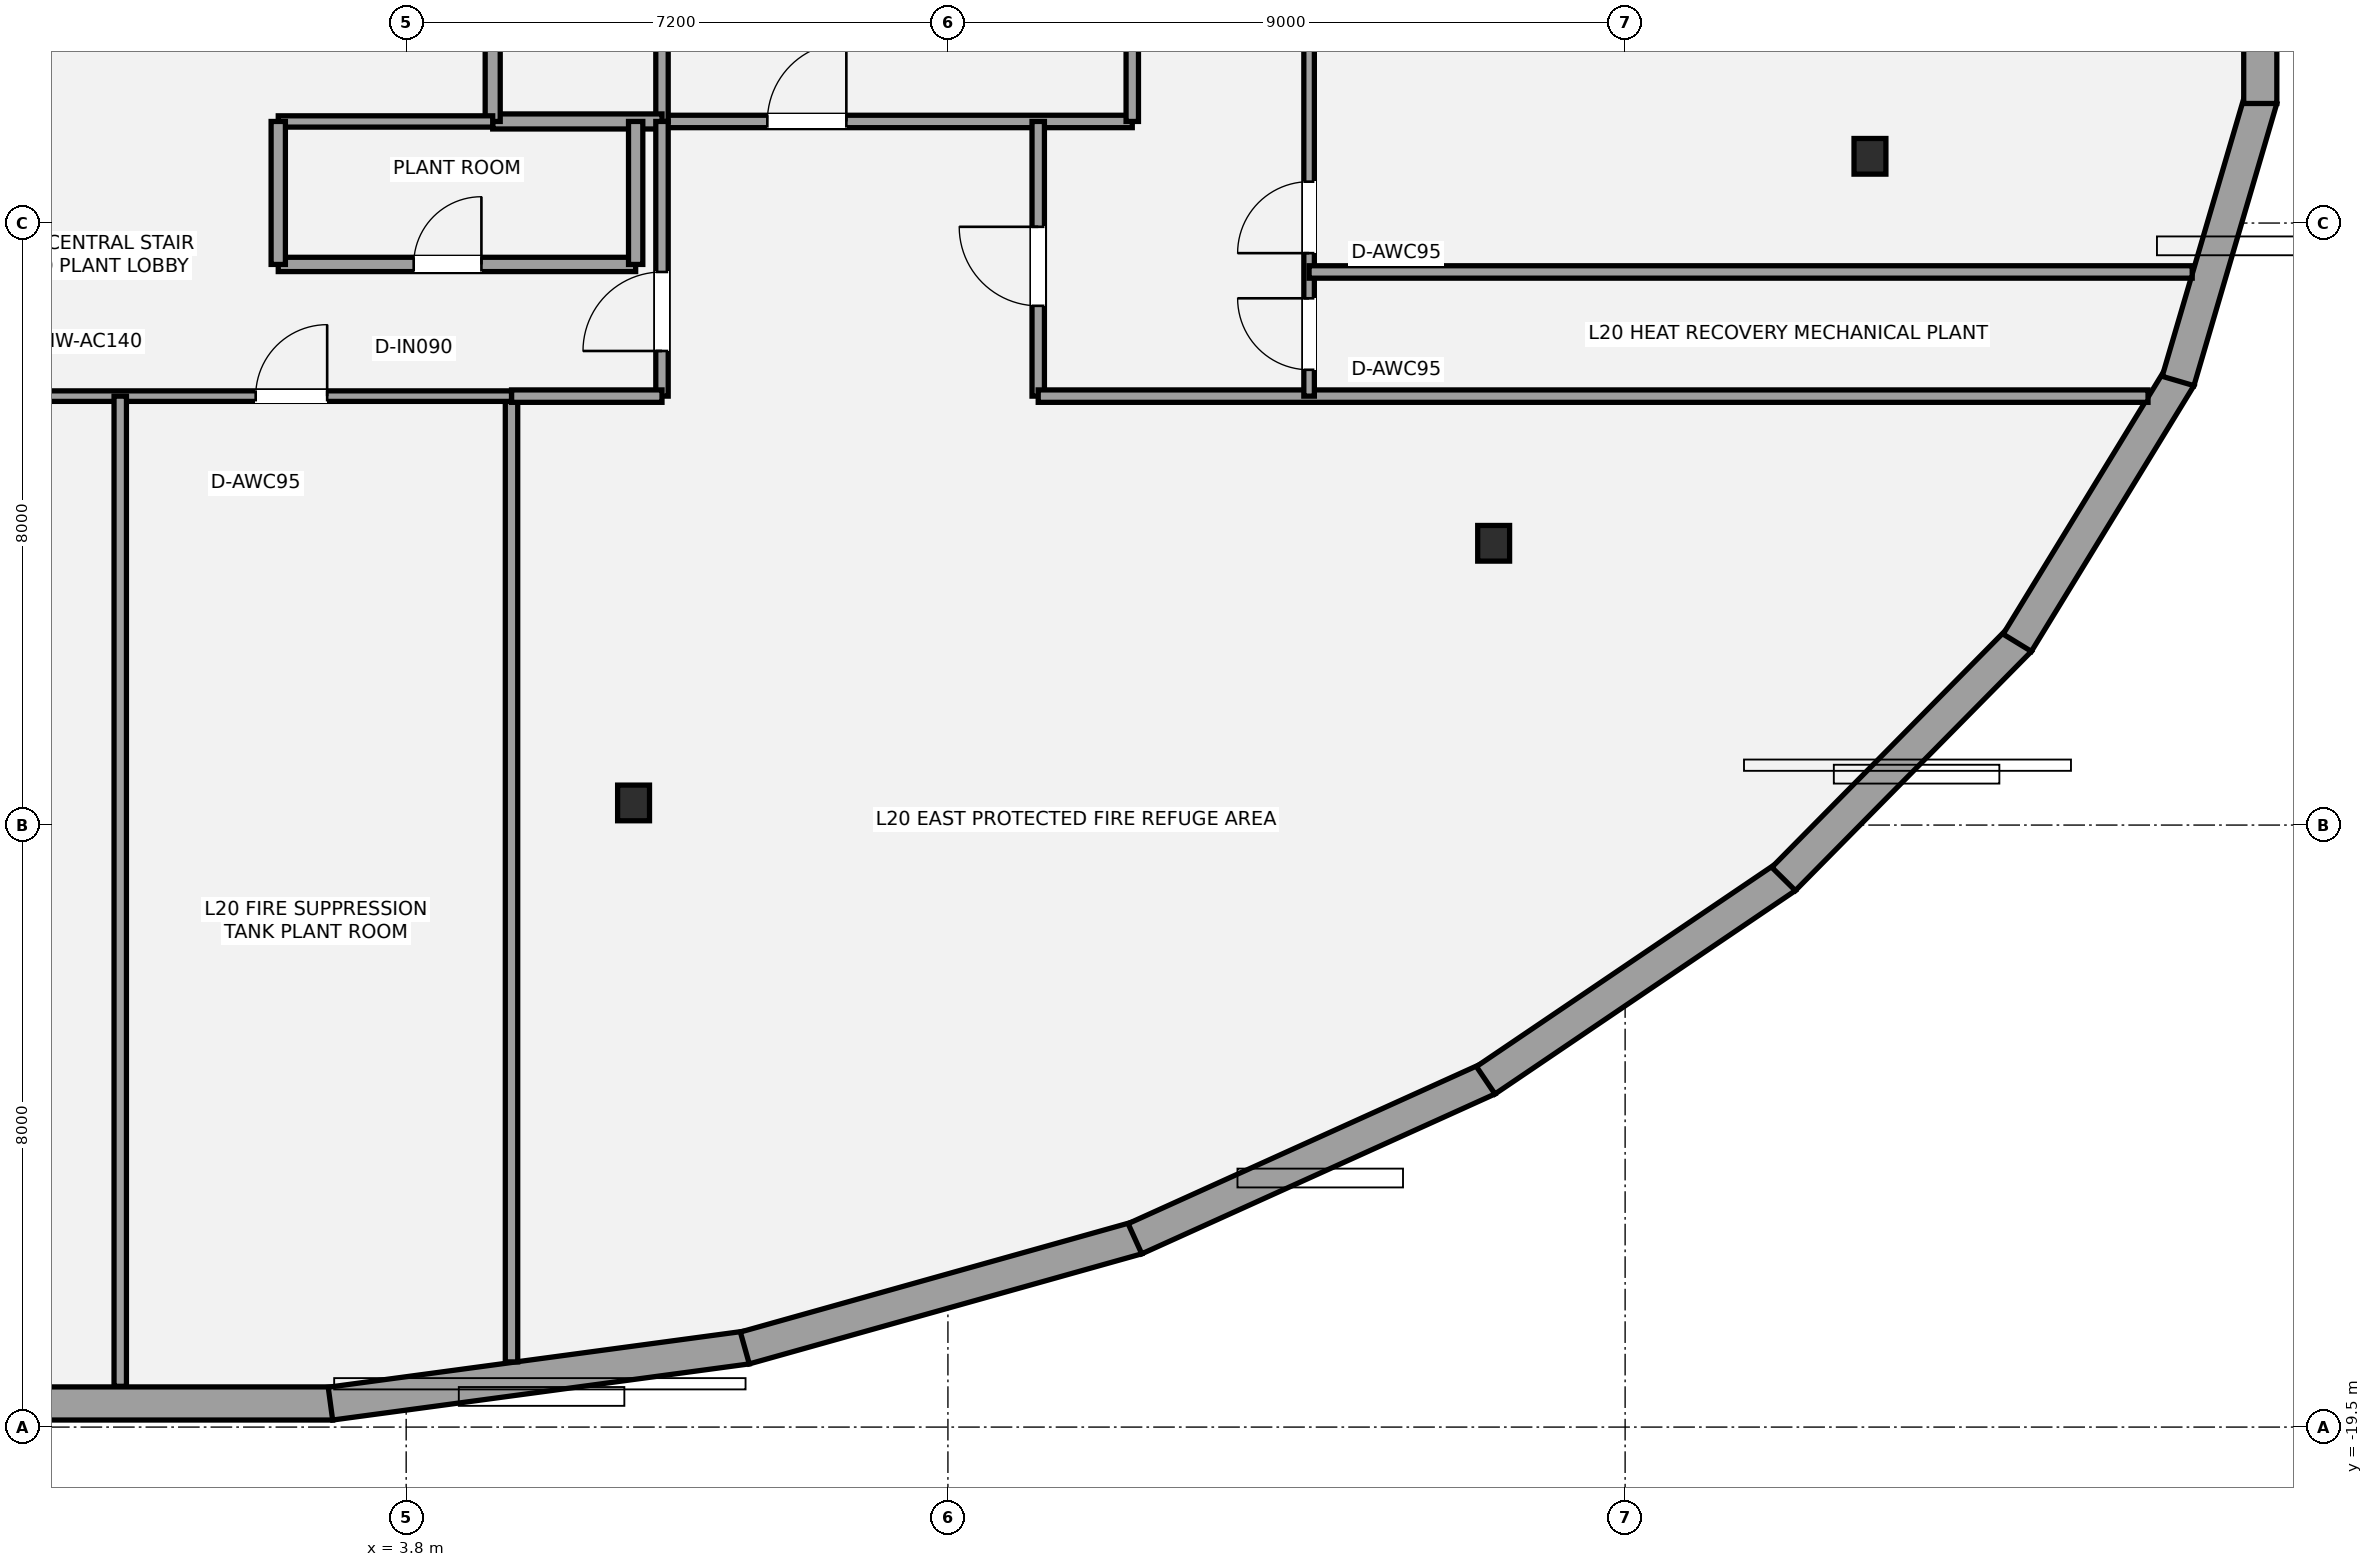
"""IFC4 building model, lengths in metres.
Left out: names, types, materials, properties, quantities, classifications, styles, units other than length and angle.
Written with IfcOpenShell. Run it as: python <this file> out.ifc"""

import sys

from ifc_helpers import new_model, si_unit, direction, frame, frame_2d, origin, origin_2d, place, context, subcontext, project, spatial, rectangle, i_section, extrude, element, fill, save


model = new_model("IFC4")
c1 = context("Model", 3, precision=1e-05, world=origin(), true_north=direction((0.0, 1.0)))
c2 = subcontext(c1, "Body", "Model", "MODEL_VIEW")
j1 = project(units=[si_unit("LENGTHUNIT", "METRE"), si_unit("PLANEANGLEUNIT", "RADIAN")], contexts=[c1])
p1 = place(None, origin())
s1 = spatial("IfcSite", under=j1, at=p1, CompositionType="ELEMENT")
p2 = place(p1, origin())
s2 = spatial("IfcBuilding", under=s1, at=p2, CompositionType="ELEMENT")
p3 = place(p2, frame((0.0, 0.0, 77.4)))
s3 = spatial("IfcBuildingStorey", under=s2, at=p3, CompositionType="ELEMENT", Elevation=77.4)
for number, where, z_axis, x_axis in (
    (1, (6.822, -11.206, 0.0), (0.0, 0.0, 1.0), (1.0, 0.0, 0.0)),
    (2, (18.253, -7.756, 0.0), (0.0, 0.0, 1.0), (1.0, 0.0, 0.0)),
    (3, (23.254, -2.613, 0.0), (0.0, 0.0, 1.0), (1.0, 0.0, 0.0)),
):
    element("IfcColumn", number, at=place(p3, frame(where, z_axis=z_axis, x_axis=x_axis)), inside=s3, PredefinedType="COLUMN", context=c2, shape_type="SweptSolid", body=[
        extrude(i_section(OverallWidth=0.424, OverallDepth=0.474, WebThickness=0.048, FlangeThickness=0.077, at=origin_2d()), origin(), (0.0, 0.0, 1.0), 4.5),
    ])
p4 = place(p3, frame((2.823, -19.186, 0.0), z_axis=(0.0, 0.0, 1.0), x_axis=(-1.0, 0.0, 0.0)))
e4 = element("IfcWall", 4, at=p4, inside=s3, PredefinedType="STANDARD", context=c2, shape_type="SweptSolid", body=[
    extrude(rectangle(XDim=5.646, YDim=0.44, at=frame_2d((2.823, 0.0))), origin(), (0.0, 0.0, 1.0), 3.498),
])
p5 = place(p3, frame((8.331, -18.442, 0.0), z_axis=(0.0, 0.0, 1.0), x_axis=(-0.9910561058, -0.133445851026, 0.0)))
e5 = element("IfcWall", 5, at=p5, inside=s3, PredefinedType="STANDARD", context=c2, shape_type="SweptSolid", body=[
    extrude(rectangle(XDim=5.587, YDim=0.44, at=frame_2d((2.794, 0.0))), origin(), (0.0, 0.0, 1.0), 3.498),
])
p6 = place(p3, frame((13.517, -16.986, 0.0), z_axis=(0.0, 0.0, 1.0), x_axis=(-0.962849260033, -0.270039446109, 0.0)))
e6 = element("IfcWall", 6, at=p6, inside=s3, PredefinedType="STANDARD", context=c2, shape_type="SweptSolid", body=[
    extrude(rectangle(XDim=5.417, YDim=0.44, at=frame_2d((2.708, 0.0))), origin(), (0.0, 0.0, 1.0), 3.498),
])
p7 = place(p3, frame((18.18, -14.873, 0.0), z_axis=(0.0, 0.0, 1.0), x_axis=(-0.911088856004, -0.412210014999, 0.0)))
e7 = element("IfcWall", 7, at=p7, inside=s3, PredefinedType="STANDARD", context=c2, shape_type="SweptSolid", body=[
    extrude(rectangle(XDim=5.152, YDim=0.44, at=frame_2d((2.576, 0.0))), origin(), (0.0, 0.0, 1.0), 3.498),
])
p8 = place(p3, frame((22.139, -12.188, 0.0), z_axis=(0.0, 0.0, 1.0), x_axis=(-0.82804003003, -0.560668983151, 0.0)))
e8 = element("IfcWall", 8, at=p8, inside=s3, PredefinedType="STANDARD", context=c2, shape_type="SweptSolid", body=[
    extrude(rectangle(XDim=4.821, YDim=0.44, at=frame_2d((2.411, 0.0))), origin(), (0.0, 0.0, 1.0), 3.498),
])
p9 = place(p3, frame((25.243, -9.038, 0.0), z_axis=(0.0, 0.0, 1.0), x_axis=(-0.702361901729, -0.711820032733, 0.0)))
e9 = element("IfcWall", 9, at=p9, inside=s3, PredefinedType="STANDARD", context=c2, shape_type="SweptSolid", body=[
    extrude(rectangle(XDim=4.466, YDim=0.44, at=frame_2d((2.233, 0.0))), origin(), (0.0, 0.0, 1.0), 3.498),
])
p10 = place(p3, frame((27.372, -5.546, 0.0), z_axis=(0.0, 0.0, 1.0), x_axis=(-0.521891226532, -0.85301204427, 0.0)))
e10 = element("IfcWall", 10, at=p10, inside=s3, PredefinedType="STANDARD", context=c2, shape_type="SweptSolid", body=[
    extrude(rectangle(XDim=4.14, YDim=0.44, at=frame_2d((2.07, 0.0))), origin(), (0.0, 0.0, 1.0), 3.498),
])
p11 = place(p3, frame((28.45, -1.849, 0.0), z_axis=(0.0, 0.0, 1.0), x_axis=(-0.281834819638, -0.959462940629, 0.0)))
e11 = element("IfcWall", 11, at=p11, inside=s3, PredefinedType="STANDARD", context=c2, shape_type="SweptSolid", body=[
    extrude(rectangle(XDim=3.908, YDim=0.44, at=frame_2d((1.954, 0.0))), origin(), (0.0, 0.0, 1.0), 3.498),
])
p12 = place(p3, frame((28.441, 1.911, 0.0), z_axis=(0.0, 0.0, 1.0), x_axis=(0.0, -1.0, 0.0)))
e12 = element("IfcWall", 12, at=p12, inside=s3, PredefinedType="STANDARD", context=c2, shape_type="SweptSolid", body=[
    extrude(rectangle(XDim=3.823, YDim=0.44, at=frame_2d((1.911, 0.0))), origin(), (0.0, 0.0, 1.0), 3.498),
])
p13 = place(p3, frame((7.2, -2.15, 0.0), z_axis=(0.0, 0.0, 1.0), x_axis=(1.0, 0.0, 0.0)))
e13 = element("IfcWall", 13, at=p13, inside=s3, PredefinedType="PARTITIONING", context=c2, shape_type="SweptSolid", body=[
    extrude(rectangle(XDim=6.25, YDim=0.165, at=frame_2d((3.125, 0.0))), origin(), (0.0, 0.0, 1.0), 4.28),
])
p14 = place(p13, frame((1.4, 0.0, 0.0)))
e14 = element("IfcOpeningElement", 14, at=p14, cuts=e13, PredefinedType="OPENING", context=c2, shape_type="SweptSolid", body=[
    extrude(rectangle(XDim=1.05, YDim=2.15, at=frame_2d((0.525, 1.075))), frame((0.0, 0.093, 0.0), z_axis=(0.0, -1.0, 0.0), x_axis=(1.0, 0.0, 0.0)), (0.0, 0.0, 1.0), 0.185),
])
p15 = place(p3, frame((7.2, -2.15, 0.0), z_axis=(0.0, 0.0, 1.0), x_axis=(0.0, 1.0, 0.0)))
e15 = element("IfcWall", 15, at=p15, inside=s3, PredefinedType="PARTITIONING", context=c2, shape_type="SweptSolid", body=[
    extrude(rectangle(XDim=3.3, YDim=0.165, at=frame_2d((1.65, 0.0))), origin(), (0.0, 0.0, 1.0), 3.733),
])
p16 = place(p3, frame((13.45, -2.15, 0.0), z_axis=(0.0, 0.0, 1.0), x_axis=(0.0, 1.0, 0.0)))
e16 = element("IfcWall", 16, at=p16, inside=s3, PredefinedType="PARTITIONING", context=c2, shape_type="SweptSolid", body=[
    extrude(rectangle(XDim=3.3, YDim=0.165, at=frame_2d((1.65, 0.0))), origin(), (0.0, 0.0, 1.0), 2.47),
])
p17 = place(p3, frame((4.95, -2.15, 0.0), z_axis=(0.0, 0.0, 1.0), x_axis=(1.0, 0.0, 0.0)))
e17 = element("IfcWall", 17, at=p17, inside=s3, PredefinedType="SOLIDWALL", context=c2, shape_type="SweptSolid", body=[
    extrude(rectangle(XDim=2.25, YDim=0.2, at=frame_2d((1.125, 0.0))), origin(), (0.0, 0.0, 1.0), 2.47),
])
p18 = place(p3, frame((4.95, -2.15, 0.0), z_axis=(0.0, 0.0, 1.0), x_axis=(0.0, 1.0, 0.0)))
e18 = element("IfcWall", 18, at=p18, inside=s3, PredefinedType="SOLIDWALL", context=c2, shape_type="SweptSolid", body=[
    extrude(rectangle(XDim=3.3, YDim=0.2, at=frame_2d((1.65, 0.0))), origin(), (0.0, 0.0, 1.0), 2.47),
])
p19 = place(p18, frame((0.95, 0.0, 0.0)))
e19 = element("IfcOpeningElement", 19, at=p19, cuts=e18, PredefinedType="OPENING", context=c2, shape_type="SweptSolid", body=[
    extrude(rectangle(XDim=0.75, YDim=2.1, at=frame_2d((0.375, 1.05))), frame((0.0, 0.11, 0.0), z_axis=(0.0, -1.0, 0.0), x_axis=(1.0, 0.0, 0.0)), (0.0, 0.0, 1.0), 0.22),
])
p20 = place(p3, frame((2.1, -4.05, 0.0), z_axis=(0.0, 0.0, 1.0), x_axis=(1.0, 0.0, 0.0)))
e20 = element("IfcWall", 20, at=p20, inside=s3, PredefinedType="PLUMBINGWALL", context=c2, shape_type="SweptSolid", body=[
    extrude(rectangle(XDim=4.75, YDim=0.19, at=frame_2d((2.375, 0.0))), origin(), (0.0, 0.0, 1.0), 2.47),
])
p21 = place(p20, frame((1.8, 0.0, 0.0)))
e21 = element("IfcOpeningElement", 21, at=p21, cuts=e20, PredefinedType="OPENING", context=c2, shape_type="SweptSolid", body=[
    extrude(rectangle(XDim=0.9, YDim=2.1, at=frame_2d((0.45, 1.05))), frame((0.0, 0.105, 0.0), z_axis=(0.0, -1.0, 0.0), x_axis=(1.0, 0.0, 0.0)), (0.0, 0.0, 1.0), 0.21),
])
p22 = place(p3, frame((2.1, -2.15, 0.0), z_axis=(0.0, 0.0, 1.0), x_axis=(1.0, 0.0, 0.0)))
e22 = element("IfcWall", 22, at=p22, inside=s3, PredefinedType="PLUMBINGWALL", context=c2, shape_type="SweptSolid", body=[
    extrude(rectangle(XDim=2.85, YDim=0.15, at=frame_2d((1.425, 0.0))), origin(), (0.0, 0.0, 1.0), 4.28),
])
for number, where, z_axis, x_axis in (
    (23, (2.1, -4.05, 0.0), (0.0, 0.0, 1.0), (0.0, 1.0, 0.0)),
    (24, (6.85, -4.05, 0.0), (0.0, 0.0, 1.0), (0.0, 1.0, 0.0)),
):
    element("IfcWall", number, at=place(p3, frame(where, z_axis=z_axis, x_axis=x_axis)), inside=s3, PredefinedType="PLUMBINGWALL", context=c2, shape_type="SweptSolid", body=[
        extrude(rectangle(XDim=1.9, YDim=0.19, at=frame_2d((0.95, 0.0))), origin(), (0.0, 0.0, 1.0), 4.28),
    ])
p23 = place(p3, frame((7.2, -5.8, 0.0), z_axis=(0.0, 0.0, 1.0), x_axis=(0.0, 1.0, 0.0)))
e25 = element("IfcWall", 25, at=p23, inside=s3, PredefinedType="PARTITIONING", context=c2, shape_type="SweptSolid", body=[
    extrude(rectangle(XDim=3.65, YDim=0.165, at=frame_2d((1.825, 0.0))), origin(), (0.0, 0.0, 1.0), 3.733),
])
p24 = place(p23, frame((0.6, 0.0, 0.0)))
e26 = element("IfcOpeningElement", 26, at=p24, cuts=e25, PredefinedType="OPENING", context=c2, shape_type="SweptSolid", body=[
    extrude(rectangle(XDim=1.05, YDim=2.15, at=frame_2d((0.525, 1.075))), frame((0.0, 0.093, 0.0), z_axis=(0.0, -1.0, 0.0), x_axis=(1.0, 0.0, 0.0)), (0.0, 0.0, 1.0), 0.185),
])
p25 = place(p3, frame((12.2, -5.8, 0.0), z_axis=(0.0, 0.0, 1.0), x_axis=(0.0, 1.0, 0.0)))
e27 = element("IfcWall", 27, at=p25, inside=s3, PredefinedType="PARTITIONING", context=c2, shape_type="SweptSolid", body=[
    extrude(rectangle(XDim=3.65, YDim=0.165, at=frame_2d((1.825, 0.0))), origin(), (0.0, 0.0, 1.0), 3.733),
])
p26 = place(p25, frame((1.2, 0.0, 0.0)))
e28 = element("IfcOpeningElement", 28, at=p26, cuts=e27, PredefinedType="OPENING", context=c2, shape_type="SweptSolid", body=[
    extrude(rectangle(XDim=1.05, YDim=2.15, at=frame_2d((0.525, 1.075))), frame((0.0, 0.093, 0.0), z_axis=(0.0, -1.0, 0.0), x_axis=(1.0, 0.0, 0.0)), (0.0, 0.0, 1.0), 0.185),
])
p27 = place(p3, frame((5.2, -18.634, 0.0), z_axis=(0.0, 0.0, 1.0), x_axis=(0.0, 1.0, 0.0)))
e29 = element("IfcWall", 29, at=p27, inside=s3, PredefinedType="PARTITIONING", context=c2, shape_type="SweptSolid", body=[
    extrude(rectangle(XDim=12.834, YDim=0.165, at=frame_2d((6.417, 0.0))), origin(), (0.0, 0.0, 1.0), 3.733),
])
p28 = place(p3, frame((5.2, -5.8, 0.0), z_axis=(0.0, 0.0, 1.0), x_axis=(1.0, 0.0, 0.0)))
e30 = element("IfcWall", 30, at=p28, inside=s3, PredefinedType="PARTITIONING", context=c2, shape_type="SweptSolid", body=[
    extrude(rectangle(XDim=2.0, YDim=0.165, at=frame_2d((1.0, 0.0))), origin(), (0.0, 0.0, 1.0), 2.47),
])
p29 = place(p3, frame((12.2, -5.8, 0.0), z_axis=(0.0, 0.0, 1.0), x_axis=(1.0, 0.0, 0.0)))
e31 = element("IfcWall", 31, at=p29, inside=s3, PredefinedType="PARTITIONING", context=c2, shape_type="SweptSolid", body=[
    extrude(rectangle(XDim=14.75, YDim=0.165, at=frame_2d((7.375, 0.0))), origin(), (0.0, 0.0, 1.0), 2.47),
])
p30 = place(p3, frame((-5.2, -5.8, 0.0), z_axis=(0.0, 0.0, 1.0), x_axis=(1.0, 0.0, 0.0)))
e32 = element("IfcWall", 32, at=p30, inside=s3, PredefinedType="PARTITIONING", context=c2, shape_type="SweptSolid", body=[
    extrude(rectangle(XDim=10.4, YDim=0.14, at=frame_2d((5.2, 0.0))), origin(), (0.0, 0.0, 1.0), 4.28),
])
p31 = place(p30, frame((1.8, 0.0, 0.0)))
e33 = element("IfcOpeningElement", 33, at=p31, cuts=e32, PredefinedType="OPENING", context=c2, shape_type="SweptSolid", body=[
    extrude(rectangle(XDim=0.95, YDim=2.15, at=frame_2d((0.475, 1.075))), frame((0.0, 0.08, 0.0), z_axis=(0.0, -1.0, 0.0), x_axis=(1.0, 0.0, 0.0)), (0.0, 0.0, 1.0), 0.16),
])
p32 = place(p30, frame((7.0, 0.0, 0.0)))
e34 = element("IfcOpeningElement", 34, at=p32, cuts=e32, PredefinedType="OPENING", context=c2, shape_type="SweptSolid", body=[
    extrude(rectangle(XDim=0.95, YDim=2.15, at=frame_2d((0.475, 1.075))), frame((0.0, 0.08, 0.0), z_axis=(0.0, -1.0, 0.0), x_axis=(1.0, 0.0, 0.0)), (0.0, 0.0, 1.0), 0.16),
])
p33 = place(p3, frame((15.8, -5.8, 0.0), z_axis=(0.0, 0.0, 1.0), x_axis=(0.0, 1.0, 0.0)))
e35 = element("IfcWall", 35, at=p33, inside=s3, PredefinedType="PARTITIONING", context=c2, shape_type="SweptSolid", body=[
    extrude(rectangle(XDim=11.2, YDim=0.14, at=frame_2d((5.6, 0.0))), origin(), (0.0, 0.0, 1.0), 2.47),
])
p34 = place(p33, frame((0.35, 0.0, 0.0)))
e36 = element("IfcOpeningElement", 36, at=p34, cuts=e35, PredefinedType="OPENING", context=c2, shape_type="SweptSolid", body=[
    extrude(rectangle(XDim=0.95, YDim=2.15, at=frame_2d((0.475, 1.075))), frame((0.0, 0.08, 0.0), z_axis=(0.0, -1.0, 0.0), x_axis=(1.0, 0.0, 0.0)), (0.0, 0.0, 1.0), 0.16),
])
p35 = place(p33, frame((1.9, 0.0, 0.0)))
e37 = element("IfcOpeningElement", 37, at=p35, cuts=e35, PredefinedType="OPENING", context=c2, shape_type="SweptSolid", body=[
    extrude(rectangle(XDim=0.95, YDim=2.15, at=frame_2d((0.475, 1.075))), frame((0.0, 0.08, 0.0), z_axis=(0.0, -1.0, 0.0), x_axis=(1.0, 0.0, 0.0)), (0.0, 0.0, 1.0), 0.16),
])
p36 = place(p3, frame((0.0, -18.958, 0.0), z_axis=(0.0, 0.0, 1.0), x_axis=(0.0, 1.0, 0.0)))
e38 = element("IfcWall", 38, at=p36, inside=s3, PredefinedType="PARTITIONING", context=c2, shape_type="SweptSolid", body=[
    extrude(rectangle(XDim=13.158, YDim=0.165, at=frame_2d((6.579, 0.0))), origin(), (0.0, 0.0, 1.0), 4.28),
])
p37 = place(p3, frame((15.8, -4.15, 0.0), z_axis=(0.0, 0.0, 1.0), x_axis=(1.0, 0.0, 0.0)))
e39 = element("IfcWall", 39, at=p37, inside=s3, PredefinedType="PARTITIONING", context=c2, shape_type="SweptSolid", body=[
    extrude(rectangle(XDim=11.737, YDim=0.165, at=frame_2d((5.868, 0.0))), origin(), (0.0, 0.0, 1.0), 2.47),
])
p38 = place(p21, origin())
e40 = element("IfcDoor", 40, at=p38, inside=s3, OperationType="SINGLE_SWING_RIGHT", PredefinedType="DOOR", context=c2, shape_type="SweptSolid", body=[
    extrude(rectangle(XDim=0.9, YDim=2.1, at=frame_2d((0.45, 1.05))), frame((0.0, 0.025, 0.0), z_axis=(0.0, -1.0, 0.0), x_axis=(1.0, 0.0, 0.0)), (0.0, 0.0, 1.0), 0.05),
])
fill(e21, e40)
p39 = place(p14, origin())
e41 = element("IfcDoor", 41, at=p39, inside=s3, OperationType="SINGLE_SWING_RIGHT", PredefinedType="DOOR", context=c2, shape_type="SweptSolid", body=[
    extrude(rectangle(XDim=1.05, YDim=2.15, at=frame_2d((0.525, 1.075))), frame((0.0, 0.025, 0.0), z_axis=(0.0, -1.0, 0.0), x_axis=(1.0, 0.0, 0.0)), (0.0, 0.0, 1.0), 0.05),
])
fill(e14, e41)
p40 = place(p24, origin())
e42 = element("IfcDoor", 42, at=p40, inside=s3, OperationType="SINGLE_SWING_LEFT", PredefinedType="DOOR", context=c2, shape_type="SweptSolid", body=[
    extrude(rectangle(XDim=1.05, YDim=2.15, at=frame_2d((0.525, 1.075))), frame((0.0, 0.025, 0.0), z_axis=(0.0, -1.0, 0.0), x_axis=(1.0, 0.0, 0.0)), (0.0, 0.0, 1.0), 0.05),
])
fill(e26, e42)
p41 = place(p26, origin())
e43 = element("IfcDoor", 43, at=p41, inside=s3, OperationType="SINGLE_SWING_RIGHT", PredefinedType="DOOR", context=c2, shape_type="SweptSolid", body=[
    extrude(rectangle(XDim=1.05, YDim=2.15, at=frame_2d((0.525, 1.075))), frame((0.0, 0.025, 0.0), z_axis=(0.0, -1.0, 0.0), x_axis=(1.0, 0.0, 0.0)), (0.0, 0.0, 1.0), 0.05),
])
fill(e28, e43)
p42 = place(p32, origin())
e44 = element("IfcDoor", 44, at=p42, inside=s3, OperationType="SINGLE_SWING_RIGHT", PredefinedType="DOOR", context=c2, shape_type="SweptSolid", body=[
    extrude(rectangle(XDim=0.95, YDim=2.15, at=frame_2d((0.475, 1.075))), frame((0.0, 0.025, 0.0), z_axis=(0.0, -1.0, 0.0), x_axis=(1.0, 0.0, 0.0)), (0.0, 0.0, 1.0), 0.05),
])
fill(e34, e44)
p43 = place(p34, origin())
e45 = element("IfcDoor", 45, at=p43, inside=s3, OperationType="SINGLE_SWING_RIGHT", PredefinedType="DOOR", context=c2, shape_type="SweptSolid", body=[
    extrude(rectangle(XDim=0.95, YDim=2.15, at=frame_2d((0.475, 1.075))), frame((0.0, 0.025, 0.0), z_axis=(0.0, -1.0, 0.0), x_axis=(1.0, 0.0, 0.0)), (0.0, 0.0, 1.0), 0.05),
])
fill(e36, e45)
p44 = place(p35, origin())
e46 = element("IfcDoor", 46, at=p44, inside=s3, OperationType="SINGLE_SWING_LEFT", PredefinedType="DOOR", context=c2, shape_type="SweptSolid", body=[
    extrude(rectangle(XDim=0.95, YDim=2.15, at=frame_2d((0.475, 1.075))), frame((0.0, 0.025, 0.0), z_axis=(0.0, -1.0, 0.0), x_axis=(1.0, 0.0, 0.0)), (0.0, 0.0, 1.0), 0.05),
])
fill(e37, e46)
save(model, sys.argv[1])
